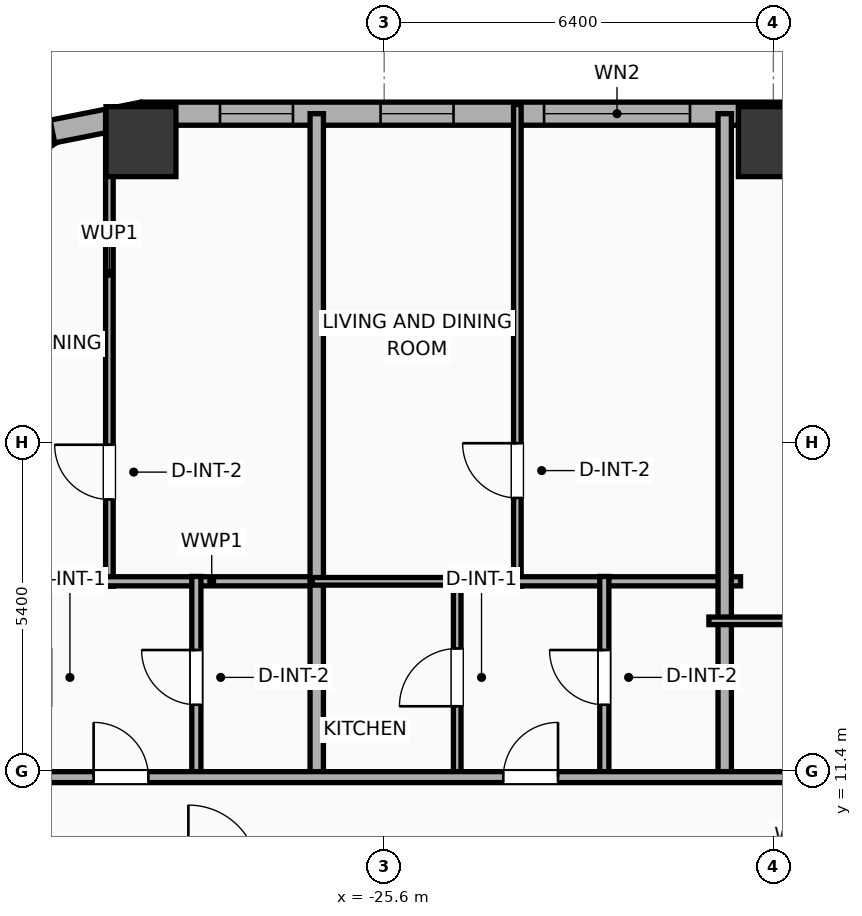
"""IFC4 building model, lengths in metres.
Left out: names, types, materials, properties, quantities, classifications, styles, units other than length and angle.
Written with IfcOpenShell. Run it as: python <this file> out.ifc"""

import sys

from ifc_helpers import new_model, si_unit, direction, frame, frame_2d, origin, origin_2d, place, context, subcontext, project, spatial, rectangle, hollow_rectangle, extrude, element, fill, save


model = new_model("IFC4")
c1 = context("Model", 3, precision=1e-05, world=origin(), true_north=direction((0.0, 1.0)))
c2 = subcontext(c1, "Body", "Model", "MODEL_VIEW")
j1 = project(units=[si_unit("LENGTHUNIT", "METRE"), si_unit("PLANEANGLEUNIT", "RADIAN")], contexts=[c1])
p1 = place(None, origin())
s1 = spatial("IfcSite", under=j1, at=p1, CompositionType="ELEMENT")
p2 = place(p1, origin())
s2 = spatial("IfcBuilding", under=s1, at=p2, CompositionType="ELEMENT")
p3 = place(p2, frame((0.0, 0.0, 49.4)))
s3 = spatial("IfcBuildingStorey", under=s2, at=p3, CompositionType="ELEMENT", Elevation=49.4)
for number, where, z_axis, x_axis in (
    (1, (-19.2, 21.75, 0.0), (0.0, 0.0, 1.0), (1.0, 0.0, 0.0)),
    (2, (-29.6, 21.75, 0.0), (0.0, 0.0, 1.0), (1.0, 0.0, 0.0)),
):
    element("IfcColumn", number, at=place(p3, frame(where, z_axis=z_axis, x_axis=x_axis)), inside=s3, PredefinedType="COLUMN", context=c2, shape_type="SweptSolid", body=[
        extrude(hollow_rectangle(XDim=1.15, YDim=1.15, WallThickness=0.04, at=origin_2d()), origin(), (0.0, 0.0, 1.0), 3.9),
    ])
p4 = place(p3, frame((-32.292, 21.091, 0.0), z_axis=(0.0, 0.0, 1.0), x_axis=(0.831442848281, 0.555610286119, 0.0)))
e3 = element("IfcWall", 3, at=p4, inside=s3, PredefinedType="ELEMENTEDWALL", context=c2, shape_type="SweptSolid", body=[
    extrude(rectangle(XDim=1.485, YDim=0.38, at=frame_2d((0.743, 0.0))), origin(), (0.0, 0.0, 1.0), 3.65),
])
p5 = place(p3, frame((-31.057, 21.917, 0.0), z_axis=(0.0, 0.0, 1.0), x_axis=(0.980786132421, 0.195086038585, 0.0)))
e4 = element("IfcWall", 4, at=p5, inside=s3, PredefinedType="ELEMENTEDWALL", context=c2, shape_type="SweptSolid", body=[
    extrude(rectangle(XDim=1.504, YDim=0.38, at=frame_2d((0.752, 0.0))), origin(), (0.0, 0.0, 1.0), 3.65),
])
p6 = place(p3, frame((-29.581, 22.21, 0.0), z_axis=(0.0, 0.0, 1.0), x_axis=(1.0, 0.0, 0.0)))
e5 = element("IfcWall", 5, at=p6, inside=s3, PredefinedType="ELEMENTEDWALL", context=c2, shape_type="SweptSolid", body=[
    extrude(rectangle(XDim=51.963, YDim=0.38, at=frame_2d((25.981, 0.0))), origin(), (0.0, 0.0, 1.0), 3.65),
])
p7 = place(p6, frame((6.61, 0.0, 0.75)))
e6 = element("IfcOpeningElement", 6, at=p7, cuts=e5, PredefinedType="OPENING", context=c2, shape_type="SweptSolid", body=[
    extrude(rectangle(XDim=2.4, YDim=2.1, at=frame_2d((1.2, 1.05))), frame((0.0, 0.2, 0.0), z_axis=(0.0, -1.0, 0.0), x_axis=(1.0, 0.0, 0.0)), (0.0, 0.0, 1.0), 0.4),
])
p8 = place(p6, frame((26.431, 0.0, 0.75)))
e7 = element("IfcOpeningElement", 7, at=p8, cuts=e5, PredefinedType="OPENING", context=c2, shape_type="SweptSolid", body=[
    extrude(rectangle(XDim=2.4, YDim=2.1, at=frame_2d((1.2, 1.05))), frame((0.0, 0.2, 0.0), z_axis=(0.0, -1.0, 0.0), x_axis=(1.0, 0.0, 0.0)), (0.0, 0.0, 1.0), 0.4),
])
p9 = place(p6, frame((43.752, 0.0, 0.75)))
e8 = element("IfcOpeningElement", 8, at=p9, cuts=e5, PredefinedType="OPENING", context=c2, shape_type="SweptSolid", body=[
    extrude(rectangle(XDim=2.4, YDim=2.1, at=frame_2d((1.2, 1.05))), frame((0.0, 0.2, 0.0), z_axis=(0.0, -1.0, 0.0), x_axis=(1.0, 0.0, 0.0)), (0.0, 0.0, 1.0), 0.4),
])
p10 = place(p6, frame((1.281, 0.0, 0.75)))
e9 = element("IfcOpeningElement", 9, at=p10, cuts=e5, PredefinedType="OPENING", context=c2, shape_type="SweptSolid", body=[
    extrude(rectangle(XDim=1.2, YDim=2.05, at=frame_2d((0.6, 1.025))), frame((0.0, 0.2, 0.0), z_axis=(0.0, -1.0, 0.0), x_axis=(1.0, 0.0, 0.0)), (0.0, 0.0, 1.0), 0.4),
])
p11 = place(p6, frame((3.922, 0.0, 0.75)))
e10 = element("IfcOpeningElement", 10, at=p11, cuts=e5, PredefinedType="OPENING", context=c2, shape_type="SweptSolid", body=[
    extrude(rectangle(XDim=1.2, YDim=2.05, at=frame_2d((0.6, 1.025))), frame((0.0, 0.2, 0.0), z_axis=(0.0, -1.0, 0.0), x_axis=(1.0, 0.0, 0.0)), (0.0, 0.0, 1.0), 0.4),
])
p12 = place(p6, frame((12.231, 0.0, 0.75)))
e11 = element("IfcOpeningElement", 11, at=p12, cuts=e5, PredefinedType="OPENING", context=c2, shape_type="SweptSolid", body=[
    extrude(rectangle(XDim=1.2, YDim=2.05, at=frame_2d((0.6, 1.025))), frame((0.0, 0.2, 0.0), z_axis=(0.0, -1.0, 0.0), x_axis=(1.0, 0.0, 0.0)), (0.0, 0.0, 1.0), 0.4),
])
p13 = place(p6, frame((18.805, 0.0, 0.75)))
e12 = element("IfcOpeningElement", 12, at=p13, cuts=e5, PredefinedType="OPENING", context=c2, shape_type="SweptSolid", body=[
    extrude(rectangle(XDim=1.2, YDim=2.05, at=frame_2d((0.6, 1.025))), frame((0.0, 0.2, 0.0), z_axis=(0.0, -1.0, 0.0), x_axis=(1.0, 0.0, 0.0)), (0.0, 0.0, 1.0), 0.4),
])
p14 = place(p6, frame((16.755, 0.0, 0.75)))
e13 = element("IfcOpeningElement", 13, at=p14, cuts=e5, PredefinedType="OPENING", context=c2, shape_type="SweptSolid", body=[
    extrude(rectangle(XDim=1.2, YDim=2.05, at=frame_2d((0.6, 1.025))), frame((0.0, 0.2, 0.0), z_axis=(0.0, -1.0, 0.0), x_axis=(1.0, 0.0, 0.0)), (0.0, 0.0, 1.0), 0.4),
])
p15 = place(p6, frame((23.776, 0.0, 0.75)))
e14 = element("IfcOpeningElement", 14, at=p15, cuts=e5, PredefinedType="OPENING", context=c2, shape_type="SweptSolid", body=[
    extrude(rectangle(XDim=1.2, YDim=2.05, at=frame_2d((0.6, 1.025))), frame((0.0, 0.2, 0.0), z_axis=(0.0, -1.0, 0.0), x_axis=(1.0, 0.0, 0.0)), (0.0, 0.0, 1.0), 0.4),
])
p16 = place(p6, frame((32.031, 0.0, 0.75)))
e15 = element("IfcOpeningElement", 15, at=p16, cuts=e5, PredefinedType="OPENING", context=c2, shape_type="SweptSolid", body=[
    extrude(rectangle(XDim=0.85, YDim=2.05, at=frame_2d((0.425, 1.025))), frame((0.0, 0.2, 0.0), z_axis=(0.0, -1.0, 0.0), x_axis=(1.0, 0.0, 0.0)), (0.0, 0.0, 1.0), 0.4),
])
p17 = place(p6, frame((34.276, 0.0, 0.75)))
e16 = element("IfcOpeningElement", 16, at=p17, cuts=e5, PredefinedType="OPENING", context=c2, shape_type="SweptSolid", body=[
    extrude(rectangle(XDim=1.2, YDim=2.05, at=frame_2d((0.6, 1.025))), frame((0.0, 0.2, 0.0), z_axis=(0.0, -1.0, 0.0), x_axis=(1.0, 0.0, 0.0)), (0.0, 0.0, 1.0), 0.4),
])
p18 = place(p6, frame((39.231, 0.0, 0.75)))
e17 = element("IfcOpeningElement", 17, at=p18, cuts=e5, PredefinedType="OPENING", context=c2, shape_type="SweptSolid", body=[
    extrude(rectangle(XDim=1.2, YDim=2.05, at=frame_2d((0.6, 1.025))), frame((0.0, 0.2, 0.0), z_axis=(0.0, -1.0, 0.0), x_axis=(1.0, 0.0, 0.0)), (0.0, 0.0, 1.0), 0.4),
])
p19 = place(p6, frame((47.676, 0.0, 0.75)))
e18 = element("IfcOpeningElement", 18, at=p19, cuts=e5, PredefinedType="OPENING", context=c2, shape_type="SweptSolid", body=[
    extrude(rectangle(XDim=1.2, YDim=2.05, at=frame_2d((0.6, 1.025))), frame((0.0, 0.2, 0.0), z_axis=(0.0, -1.0, 0.0), x_axis=(1.0, 0.0, 0.0)), (0.0, 0.0, 1.0), 0.4),
])
p20 = place(p6, frame((49.847, 0.0, 0.75)))
e19 = element("IfcOpeningElement", 19, at=p20, cuts=e5, PredefinedType="OPENING", context=c2, shape_type="SweptSolid", body=[
    extrude(rectangle(XDim=1.2, YDim=2.05, at=frame_2d((0.6, 1.025))), frame((0.0, 0.2, 0.0), z_axis=(0.0, -1.0, 0.0), x_axis=(1.0, 0.0, 0.0)), (0.0, 0.0, 1.0), 0.4),
])
p21 = place(p3, frame((-30.119, 14.44, 0.0), z_axis=(0.0, 0.0, 1.0), x_axis=(0.0, 1.0, 0.0)))
e20 = element("IfcWall", 20, at=p21, inside=s3, PredefinedType="PARTITIONING", context=c2, shape_type="SweptSolid", body=[
    extrude(rectangle(XDim=7.816, YDim=0.125, at=frame_2d((3.908, 0.0))), origin(), (0.0, 0.0, 1.0), 3.65),
])
p22 = place(p21, frame((1.426, 0.0, 0.0)))
e21 = element("IfcOpeningElement", 21, at=p22, cuts=e20, PredefinedType="OPENING", context=c2, shape_type="SweptSolid", body=[
    extrude(rectangle(XDim=0.9, YDim=2.05, at=frame_2d((0.45, 1.025))), frame((0.0, 0.073, 0.0), z_axis=(0.0, -1.0, 0.0), x_axis=(1.0, 0.0, 0.0)), (0.0, 0.0, 1.0), 0.145),
])
p23 = place(p3, frame((-30.239, 14.52, 0.0), z_axis=(0.0, 0.0, 1.0), x_axis=(1.0, 0.0, 0.0)))
e22 = element("IfcWall", 22, at=p23, inside=s3, PredefinedType="PLUMBINGWALL", context=c2, shape_type="SweptSolid", body=[
    extrude(rectangle(XDim=3.605, YDim=0.15, at=frame_2d((1.802, 0.0))), origin(), (0.0, 0.0, 1.0), 3.65),
])
p24 = place(p3, frame((-33.56, 14.52, 0.0), z_axis=(0.0, 0.0, 1.0), x_axis=(1.0, 0.0, 0.0)))
e23 = element("IfcWall", 23, at=p24, inside=s3, PredefinedType="PARTITIONING", context=c2, shape_type="SweptSolid", body=[
    extrude(rectangle(XDim=2.512, YDim=0.125, at=frame_2d((1.256, 0.0))), origin(), (0.0, 0.0, 1.0), 3.65),
])
p25 = place(p3, frame((-28.689, 11.28, 0.0), z_axis=(0.0, 0.0, 1.0), x_axis=(0.0, 1.0, 0.0)))
e24 = element("IfcWall", 24, at=p25, inside=s3, PredefinedType="PLUMBINGWALL", context=c2, shape_type="SweptSolid", body=[
    extrude(rectangle(XDim=3.32, YDim=0.15, at=frame_2d((1.66, 0.0))), origin(), (0.0, 0.0, 1.0), 3.65),
])
p26 = place(p25, frame((1.21, 0.0, 0.0)))
e25 = element("IfcOpeningElement", 25, at=p26, cuts=e24, PredefinedType="OPENING", context=c2, shape_type="SweptSolid", body=[
    extrude(rectangle(XDim=0.9, YDim=2.05, at=frame_2d((0.45, 1.025))), frame((0.0, 0.085, 0.0), z_axis=(0.0, -1.0, 0.0), x_axis=(1.0, 0.0, 0.0)), (0.0, 0.0, 1.0), 0.17),
])
p27 = place(p3, frame((-26.709, 11.22, 0.0), z_axis=(0.0, 0.0, 1.0), x_axis=(0.0, 1.0, 0.0)))
e26 = element("IfcWall", 26, at=p27, inside=s3, PredefinedType="PARTITIONING", context=c2, shape_type="SweptSolid", body=[
    extrude(rectangle(XDim=10.99, YDim=0.22, at=frame_2d((5.495, 0.0))), origin(), (0.0, 0.0, 1.0), 3.65),
])
p28 = place(p3, frame((-23.41, 14.44, 0.0), z_axis=(0.0, 0.0, 1.0), x_axis=(0.0, 1.0, 0.0)))
e27 = element("IfcWall", 27, at=p28, inside=s3, PredefinedType="PARTITIONING", context=c2, shape_type="SweptSolid", body=[
    extrude(rectangle(XDim=7.92, YDim=0.125, at=frame_2d((3.96, 0.0))), origin(), (0.0, 0.0, 1.0), 3.65),
])
p29 = place(p28, frame((1.451, 0.0, 0.0)))
e28 = element("IfcOpeningElement", 28, at=p29, cuts=e27, PredefinedType="OPENING", context=c2, shape_type="SweptSolid", body=[
    extrude(rectangle(XDim=0.9, YDim=2.05, at=frame_2d((0.45, 1.025))), frame((0.0, 0.073, 0.0), z_axis=(0.0, -1.0, 0.0), x_axis=(1.0, 0.0, 0.0)), (0.0, 0.0, 1.0), 0.145),
])
p30 = place(p3, frame((-23.53, 14.52, 0.0), z_axis=(0.0, 0.0, 1.0), x_axis=(1.0, 0.0, 0.0)))
e29 = element("IfcWall", 29, at=p30, inside=s3, PredefinedType="PLUMBINGWALL", context=c2, shape_type="SweptSolid", body=[
    extrude(rectangle(XDim=3.79, YDim=0.15, at=frame_2d((1.895, 0.0))), origin(), (0.0, 0.0, 1.0), 3.65),
])
p31 = place(p3, frame((-24.399, 11.28, 0.0), z_axis=(0.0, 0.0, 1.0), x_axis=(0.0, 1.0, 0.0)))
e30 = element("IfcWall", 30, at=p31, inside=s3, PredefinedType="PARTITIONING", context=c2, shape_type="SweptSolid", body=[
    extrude(rectangle(XDim=3.32, YDim=0.125, at=frame_2d((1.66, 0.0))), origin(), (0.0, 0.0, 1.0), 3.65),
])
p32 = place(p31, frame((1.185, 0.0, 0.0)))
e31 = element("IfcOpeningElement", 31, at=p32, cuts=e30, PredefinedType="OPENING", context=c2, shape_type="SweptSolid", body=[
    extrude(rectangle(XDim=0.95, YDim=2.05, at=frame_2d((0.475, 1.025))), frame((0.0, 0.073, 0.0), z_axis=(0.0, -1.0, 0.0), x_axis=(1.0, 0.0, 0.0)), (0.0, 0.0, 1.0), 0.145),
])
p33 = place(p3, frame((-26.784, 14.52, 0.0), z_axis=(0.0, 0.0, 1.0), x_axis=(1.0, 0.0, 0.0)))
e32 = element("IfcWall", 32, at=p33, inside=s3, PredefinedType="PARTITIONING", context=c2, shape_type="SweptSolid", body=[
    extrude(rectangle(XDim=2.505, YDim=0.125, at=frame_2d((1.252, 0.0))), origin(), (0.0, 0.0, 1.0), 3.65),
])
p34 = place(p3, frame((-21.98, 11.28, 0.0), z_axis=(0.0, 0.0, 1.0), x_axis=(0.0, 1.0, 0.0)))
e33 = element("IfcWall", 33, at=p34, inside=s3, PredefinedType="PLUMBINGWALL", context=c2, shape_type="SweptSolid", body=[
    extrude(rectangle(XDim=3.32, YDim=0.15, at=frame_2d((1.66, 0.0))), origin(), (0.0, 0.0, 1.0), 3.65),
])
p35 = place(p34, frame((1.21, 0.0, 0.0)))
e34 = element("IfcOpeningElement", 34, at=p35, cuts=e33, PredefinedType="OPENING", context=c2, shape_type="SweptSolid", body=[
    extrude(rectangle(XDim=0.9, YDim=2.05, at=frame_2d((0.45, 1.025))), frame((0.0, 0.085, 0.0), z_axis=(0.0, -1.0, 0.0), x_axis=(1.0, 0.0, 0.0)), (0.0, 0.0, 1.0), 0.17),
])
p36 = place(p3, frame((-20.0, 11.22, 0.0), z_axis=(0.0, 0.0, 1.0), x_axis=(0.0, 1.0, 0.0)))
e35 = element("IfcWall", 35, at=p36, inside=s3, PredefinedType="PARTITIONING", context=c2, shape_type="SweptSolid", body=[
    extrude(rectangle(XDim=10.99, YDim=0.22, at=frame_2d((5.495, 0.0))), origin(), (0.0, 0.0, 1.0), 3.65),
])
p37 = place(p3, frame((-20.26, 13.87, 0.0), z_axis=(0.0, 0.0, 1.0), x_axis=(1.0, 0.0, 0.0)))
e36 = element("IfcWall", 36, at=p37, inside=s3, PredefinedType="PARTITIONING", context=c2, shape_type="SweptSolid", body=[
    extrude(rectangle(XDim=2.804, YDim=0.125, at=frame_2d((1.402, 0.0))), origin(), (0.0, 0.0, 1.0), 3.65),
])
p38 = place(p3, frame((-33.41, 11.3, 0.0), z_axis=(0.0, 0.0, 1.0), x_axis=(1.0, 0.0, 0.0)))
e37 = element("IfcWall", 37, at=p38, inside=s3, PredefinedType="PARTITIONING", context=c2, shape_type="SweptSolid", body=[
    extrude(rectangle(XDim=59.62, YDim=0.18, at=frame_2d((29.81, 0.0))), origin(), (0.0, 0.0, 1.0), 3.65),
])
p39 = place(p38, frame((3.032, 0.0, 0.0)))
e38 = element("IfcOpeningElement", 38, at=p39, cuts=e37, PredefinedType="OPENING", context=c2, shape_type="SweptSolid", body=[
    extrude(rectangle(XDim=0.9, YDim=2.05, at=frame_2d((0.45, 1.025))), frame((0.0, 0.1, 0.0), z_axis=(0.0, -1.0, 0.0), x_axis=(1.0, 0.0, 0.0)), (0.0, 0.0, 1.0), 0.2),
])
p40 = place(p38, frame((9.769, 0.0, 0.0)))
e39 = element("IfcOpeningElement", 39, at=p40, cuts=e37, PredefinedType="OPENING", context=c2, shape_type="SweptSolid", body=[
    extrude(rectangle(XDim=0.9, YDim=2.05, at=frame_2d((0.45, 1.025))), frame((0.0, 0.1, 0.0), z_axis=(0.0, -1.0, 0.0), x_axis=(1.0, 0.0, 0.0)), (0.0, 0.0, 1.0), 0.2),
])
p41 = place(p38, frame((16.339, 0.0, 0.0)))
e40 = element("IfcOpeningElement", 40, at=p41, cuts=e37, PredefinedType="OPENING", context=c2, shape_type="SweptSolid", body=[
    extrude(rectangle(XDim=0.9, YDim=2.05, at=frame_2d((0.45, 1.025))), frame((0.0, 0.1, 0.0), z_axis=(0.0, -1.0, 0.0), x_axis=(1.0, 0.0, 0.0)), (0.0, 0.0, 1.0), 0.2),
])
p42 = place(p38, frame((23.827, 0.0, 0.0)))
e41 = element("IfcOpeningElement", 41, at=p42, cuts=e37, PredefinedType="OPENING", context=c2, shape_type="SweptSolid", body=[
    extrude(rectangle(XDim=1.15, YDim=2.05, at=frame_2d((0.575, 1.025))), frame((0.0, 0.1, 0.0), z_axis=(0.0, -1.0, 0.0), x_axis=(1.0, 0.0, 0.0)), (0.0, 0.0, 1.0), 0.2),
])
p43 = place(p38, frame((29.622, 0.0, 0.0)))
e42 = element("IfcOpeningElement", 42, at=p43, cuts=e37, PredefinedType="OPENING", context=c2, shape_type="SweptSolid", body=[
    extrude(rectangle(XDim=0.9, YDim=2.05, at=frame_2d((0.45, 1.025))), frame((0.0, 0.1, 0.0), z_axis=(0.0, -1.0, 0.0), x_axis=(1.0, 0.0, 0.0)), (0.0, 0.0, 1.0), 0.2),
])
p44 = place(p38, frame((36.628, 0.0, 0.0)))
e43 = element("IfcOpeningElement", 43, at=p44, cuts=e37, PredefinedType="OPENING", context=c2, shape_type="SweptSolid", body=[
    extrude(rectangle(XDim=0.9, YDim=2.05, at=frame_2d((0.45, 1.025))), frame((0.0, 0.1, 0.0), z_axis=(0.0, -1.0, 0.0), x_axis=(1.0, 0.0, 0.0)), (0.0, 0.0, 1.0), 0.2),
])
p45 = place(p38, frame((43.335, 0.0, 0.0)))
e44 = element("IfcOpeningElement", 44, at=p45, cuts=e37, PredefinedType="OPENING", context=c2, shape_type="SweptSolid", body=[
    extrude(rectangle(XDim=0.9, YDim=2.05, at=frame_2d((0.45, 1.025))), frame((0.0, 0.1, 0.0), z_axis=(0.0, -1.0, 0.0), x_axis=(1.0, 0.0, 0.0)), (0.0, 0.0, 1.0), 0.2),
])
p46 = place(p38, frame((48.307, 0.0, 0.0)))
e45 = element("IfcOpeningElement", 45, at=p46, cuts=e37, PredefinedType="OPENING", context=c2, shape_type="SweptSolid", body=[
    extrude(rectangle(XDim=1.15, YDim=2.05, at=frame_2d((0.575, 1.025))), frame((0.0, 0.1, 0.0), z_axis=(0.0, -1.0, 0.0), x_axis=(1.0, 0.0, 0.0)), (0.0, 0.0, 1.0), 0.2),
])
p47 = place(p38, frame((56.225, 0.0, 0.0)))
e46 = element("IfcOpeningElement", 46, at=p47, cuts=e37, PredefinedType="OPENING", context=c2, shape_type="SweptSolid", body=[
    extrude(rectangle(XDim=0.9, YDim=2.05, at=frame_2d((0.45, 1.025))), frame((0.0, 0.1, 0.0), z_axis=(0.0, -1.0, 0.0), x_axis=(1.0, 0.0, 0.0)), (0.0, 0.0, 1.0), 0.2),
])
p48 = place(p7, origin())
e47 = element("IfcWindow", 47, at=p48, inside=s3, PartitioningType="SINGLE_PANEL", PredefinedType="WINDOW", context=c2, shape_type="SweptSolid", body=[
    extrude(rectangle(XDim=2.4, YDim=2.1, at=frame_2d((1.2, 1.05))), frame((0.0, 0.03, 0.0), z_axis=(0.0, -1.0, 0.0), x_axis=(1.0, 0.0, 0.0)), (0.0, 0.0, 1.0), 0.06),
])
fill(e6, e47)
p49 = place(p10, origin())
e48 = element("IfcWindow", 48, at=p49, inside=s3, PartitioningType="SINGLE_PANEL", PredefinedType="WINDOW", context=c2, shape_type="SweptSolid", body=[
    extrude(rectangle(XDim=1.2, YDim=2.05, at=frame_2d((0.6, 1.025))), frame((0.0, 0.03, 0.0), z_axis=(0.0, -1.0, 0.0), x_axis=(1.0, 0.0, 0.0)), (0.0, 0.0, 1.0), 0.06),
])
fill(e9, e48)
p50 = place(p11, origin())
e49 = element("IfcWindow", 49, at=p50, inside=s3, PartitioningType="SINGLE_PANEL", PredefinedType="WINDOW", context=c2, shape_type="SweptSolid", body=[
    extrude(rectangle(XDim=1.2, YDim=2.05, at=frame_2d((0.6, 1.025))), frame((0.0, 0.03, 0.0), z_axis=(0.0, -1.0, 0.0), x_axis=(1.0, 0.0, 0.0)), (0.0, 0.0, 1.0), 0.06),
])
fill(e10, e49)
p51 = place(p22, origin())
e50 = element("IfcDoor", 50, at=p51, inside=s3, OperationType="SINGLE_SWING_RIGHT", PredefinedType="DOOR", context=c2, shape_type="SweptSolid", body=[
    extrude(rectangle(XDim=0.9, YDim=2.05, at=frame_2d((0.45, 1.025))), frame((0.0, 0.025, 0.0), z_axis=(0.0, -1.0, 0.0), x_axis=(1.0, 0.0, 0.0)), (0.0, 0.0, 1.0), 0.05),
])
fill(e21, e50)
p52 = place(p26, origin())
e51 = element("IfcDoor", 51, at=p52, inside=s3, OperationType="SINGLE_SWING_RIGHT", PredefinedType="DOOR", context=c2, shape_type="SweptSolid", body=[
    extrude(rectangle(XDim=0.9, YDim=2.05, at=frame_2d((0.45, 1.025))), frame((0.0, 0.025, 0.0), z_axis=(0.0, -1.0, 0.0), x_axis=(1.0, 0.0, 0.0)), (0.0, 0.0, 1.0), 0.05),
])
fill(e25, e51)
p53 = place(p29, origin())
e52 = element("IfcDoor", 52, at=p53, inside=s3, OperationType="SINGLE_SWING_RIGHT", PredefinedType="DOOR", context=c2, shape_type="SweptSolid", body=[
    extrude(rectangle(XDim=0.9, YDim=2.05, at=frame_2d((0.45, 1.025))), frame((0.0, 0.025, 0.0), z_axis=(0.0, -1.0, 0.0), x_axis=(1.0, 0.0, 0.0)), (0.0, 0.0, 1.0), 0.05),
])
fill(e28, e52)
p54 = place(p32, origin())
e53 = element("IfcDoor", 53, at=p54, inside=s3, OperationType="SINGLE_SWING_LEFT", PredefinedType="DOOR", context=c2, shape_type="SweptSolid", body=[
    extrude(rectangle(XDim=0.95, YDim=2.05, at=frame_2d((0.475, 1.025))), frame((0.0, 0.025, 0.0), z_axis=(0.0, -1.0, 0.0), x_axis=(1.0, 0.0, 0.0)), (0.0, 0.0, 1.0), 0.05),
])
fill(e31, e53)
p55 = place(p35, origin())
e54 = element("IfcDoor", 54, at=p55, inside=s3, OperationType="SINGLE_SWING_RIGHT", PredefinedType="DOOR", context=c2, shape_type="SweptSolid", body=[
    extrude(rectangle(XDim=0.9, YDim=2.05, at=frame_2d((0.45, 1.025))), frame((0.0, 0.025, 0.0), z_axis=(0.0, -1.0, 0.0), x_axis=(1.0, 0.0, 0.0)), (0.0, 0.0, 1.0), 0.05),
])
fill(e34, e54)
p56 = place(p39, origin())
e55 = element("IfcDoor", 55, at=p56, inside=s3, OperationType="SINGLE_SWING_LEFT", PredefinedType="DOOR", context=c2, shape_type="SweptSolid", body=[
    extrude(rectangle(XDim=0.9, YDim=2.05, at=frame_2d((0.45, 1.025))), frame((0.0, 0.025, 0.0), z_axis=(0.0, -1.0, 0.0), x_axis=(1.0, 0.0, 0.0)), (0.0, 0.0, 1.0), 0.05),
])
fill(e38, e55)
p57 = place(p40, origin())
e56 = element("IfcDoor", 56, at=p57, inside=s3, OperationType="SINGLE_SWING_RIGHT", PredefinedType="DOOR", context=c2, shape_type="SweptSolid", body=[
    extrude(rectangle(XDim=0.9, YDim=2.05, at=frame_2d((0.45, 1.025))), frame((0.0, 0.025, 0.0), z_axis=(0.0, -1.0, 0.0), x_axis=(1.0, 0.0, 0.0)), (0.0, 0.0, 1.0), 0.05),
])
fill(e39, e56)
save(model, sys.argv[1])
